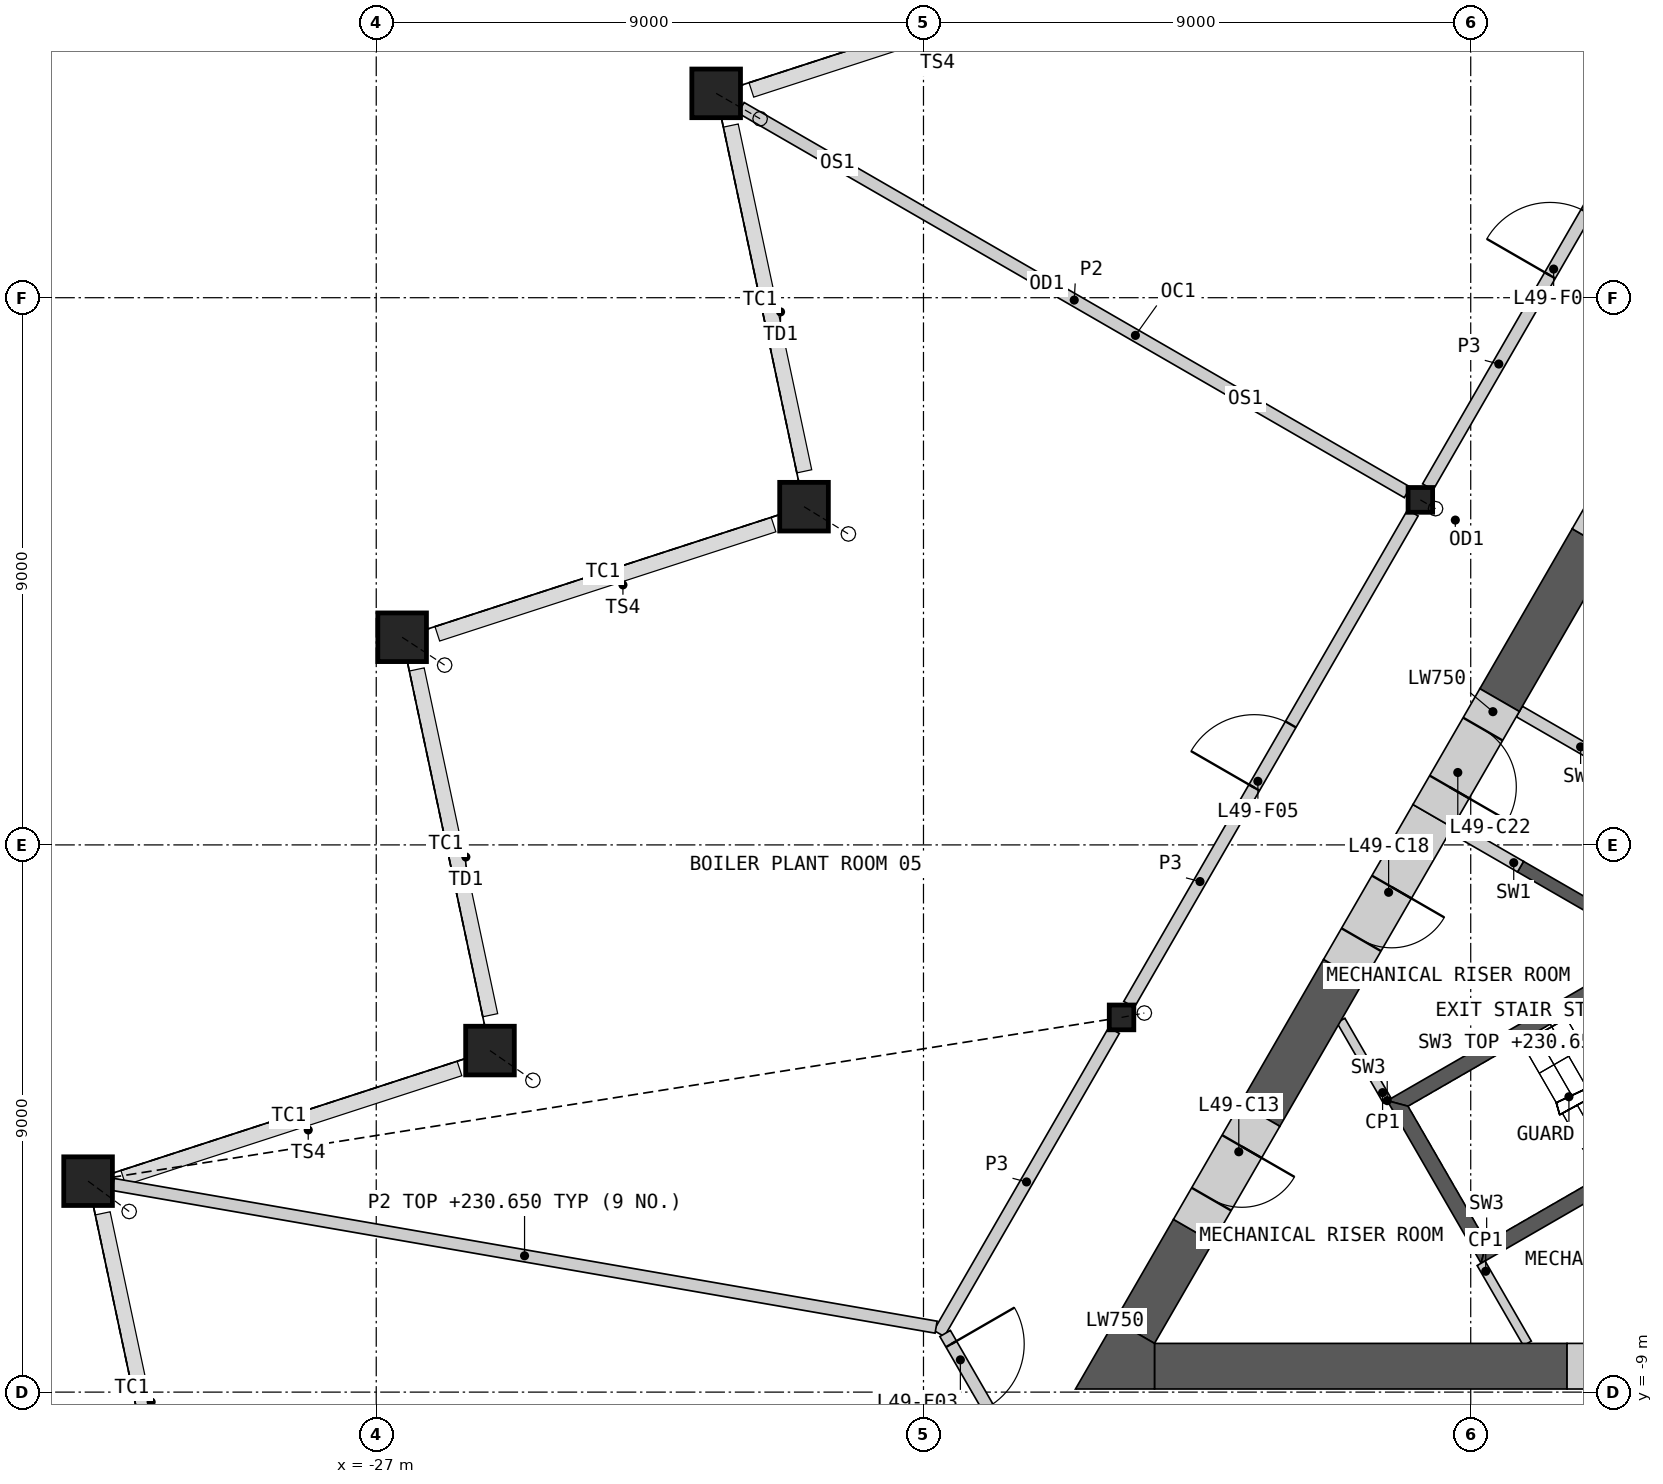
"""IFC4 building model, lengths in metres.
Left out: names, types, materials, properties, quantities, classifications, styles, units other than length and angle.
Written with IfcOpenShell. Run it as: python <this file> out.ifc"""

import sys

from ifc_helpers import new_model, si_unit, direction, frame, frame_2d, origin, origin_2d, place, context, subcontext, project, spatial, polyline, rectangle, hollow_rectangle, i_section, outline, extrude, element, fill, save


model = new_model("IFC4")
c1 = context("Model", 3, precision=1e-05, world=origin(), true_north=direction((0.0, 1.0)))
c2 = subcontext(c1, "Body", "Model", "MODEL_VIEW")
j1 = project(units=[si_unit("LENGTHUNIT", "METRE"), si_unit("PLANEANGLEUNIT", "RADIAN")], contexts=[c1])
p1 = place(None, origin())
s1 = spatial("IfcSite", under=j1, at=p1, CompositionType="ELEMENT")
p2 = place(p1, origin())
s2 = spatial("IfcBuilding", under=s1, at=p2, CompositionType="ELEMENT")
p3 = place(p2, frame((0.0, 0.0, 226.0)))
s3 = spatial("IfcBuildingStorey", under=s2, at=p3, CompositionType="ELEMENT", Elevation=226.0)
p4 = place(p3, frame((-21.409, 12.361, 0.0), z_axis=(0.142558983537, -0.082356710084, 0.986354048259), x_axis=(0.500228859883, 0.865893231143, 0.0)))
e1 = element("IfcColumn", 1, at=p4, inside=s3, PredefinedType="COLUMN", context=c2, shape_type="SweptSolid", body=[
    extrude(hollow_rectangle(XDim=0.8, YDim=0.8, WallThickness=0.05, at=origin_2d()), frame((0.0, 0.0, 0.067)), (0.0, 0.0, 1.0), 4.936),
])
p5 = place(p3, frame((-19.965, 5.563, 0.0), z_axis=(0.143805256431, -0.088362266, 0.985653163222), x_axis=(0.52352457136, 0.852010576919, 0.0)))
e2 = element("IfcColumn", 2, at=p5, inside=s3, PredefinedType="COLUMN", context=c2, shape_type="SweptSolid", body=[
    extrude(hollow_rectangle(XDim=0.8, YDim=0.8, WallThickness=0.05, at=origin_2d()), frame((0.0, 0.0, 0.069)), (0.0, 0.0, 1.0), 4.936),
])
p6 = place(p3, frame((-26.574, 3.415, 0.0), z_axis=(0.137929662691, -0.090347781846, 0.986312671755), x_axis=(0.547941692307, 0.836516528128, 0.0)))
e3 = element("IfcColumn", 3, at=p6, inside=s3, PredefinedType="COLUMN", context=c2, shape_type="SweptSolid", body=[
    extrude(hollow_rectangle(XDim=0.8, YDim=0.8, WallThickness=0.05, at=origin_2d()), frame((0.0, 0.0, 0.067)), (0.0, 0.0, 1.0), 4.936),
])
p7 = place(p3, frame((-25.129, -3.383, 0.0), z_axis=(0.139172656038, -0.096391020071, 0.985565696979), x_axis=(0.569372564358, 0.822079608649, 0.0)))
e4 = element("IfcColumn", 4, at=p7, inside=s3, PredefinedType="COLUMN", context=c2, shape_type="SweptSolid", body=[
    extrude(hollow_rectangle(XDim=0.8, YDim=0.8, WallThickness=0.05, at=origin_2d()), frame((0.0, 0.0, 0.069)), (0.0, 0.0, 1.0), 4.936),
])
p8 = place(p3, frame((-31.739, -5.53, 0.0), z_axis=(0.133288732676, -0.098377485859, 0.986182530781), x_axis=(0.593843336629, 0.804580692995, 0.0)))
e5 = element("IfcColumn", 5, at=p8, inside=s3, PredefinedType="COLUMN", context=c2, shape_type="SweptSolid", body=[
    extrude(hollow_rectangle(XDim=0.8, YDim=0.8, WallThickness=0.05, at=origin_2d()), frame((0.0, 0.0, 0.067)), (0.0, 0.0, 1.0), 4.936),
])
p9 = place(p3, frame((-9.828, 5.675, 0.0), z_axis=(0.049916818753, -0.028858160841, 0.998336375055), x_axis=(0.500502949238, 0.865734831114, 0.0)))
e6 = element("IfcColumn", 6, at=p9, inside=s3, PredefinedType="COLUMN", context=c2, shape_type="SweptSolid", body=[
    extrude(i_section(OverallWidth=0.404, OverallDepth=0.407, WebThickness=0.027, FlangeThickness=0.044, at=origin_2d()), frame((0.0, 0.0, 0.012)), (0.0, 0.0, 1.0), 4.985),
])
p10 = place(p3, frame((-14.743, -2.837, 0.0), z_axis=(0.074782233985, 0.014362473324, 0.997096453128), x_axis=(-0.188610251533, 0.982052021543, 0.0)))
e7 = element("IfcColumn", 7, at=p10, inside=s3, PredefinedType="COLUMN", context=c2, shape_type="SweptSolid", body=[
    extrude(i_section(OverallWidth=0.404, OverallDepth=0.407, WebThickness=0.027, FlangeThickness=0.044, at=origin_2d()), frame((0.0, 0.0, 0.016)), (0.0, 0.0, 1.0), 4.983),
])
p11 = place(p3, origin())
e8 = element("IfcWall", 8, at=p11, inside=s3, PredefinedType="SHEAR", context=c2, shape_type="SweptSolid", body=[
    extrude(outline(polyline([(-6.061, -1.697), (-8.231, -0.444), (-8.131, -0.271), (-5.96, -1.524), (-6.061, -1.697)])), origin(), (0.0, 0.0, 1.0), 4.65),
])
for number, where, z_axis, x_axis in (
    (9, (-7.081, 1.548, 0.0), (0.0, 0.0, 1.0), (-0.866, 0.5, 0.0)),
    (10, (-8.181, -0.357, 0.0), (0.0, 0.0, 1.0), (-0.866, 0.5, 0.0)),
):
    element("IfcWall", number, at=place(p3, frame(where, z_axis=z_axis, x_axis=x_axis)), inside=s3, PredefinedType="SHEAR", context=c2, shape_type="SweptSolid", body=[
        extrude(rectangle(XDim=1.293, YDim=0.2, at=frame_2d((0.646, 0.0))), origin(), (0.0, 0.0, 1.0), 4.65),
    ])
p12 = place(p3, origin())
e11 = element("IfcWall", 11, at=p12, inside=s3, PredefinedType="SHEAR", context=c2, shape_type="SweptSolid", body=[
    extrude(outline(polyline([(-5.307, -1.281), (-10.374, -4.206), (-10.032, -4.298), (-5.182, -1.498), (-5.307, -1.281)])), origin(), (0.0, 0.0, 1.0), 4.65),
])
p13 = place(p3, origin())
e12 = element("IfcWall", 12, at=p13, inside=s3, PredefinedType="SHEAR", context=c2, shape_type="SweptSolid", body=[
    extrude(outline(polyline([(-10.374, -4.206), (-8.83, -6.881), (-8.738, -6.539), (-10.032, -4.298), (-10.374, -4.206)])), origin(), (0.0, 0.0, 1.0), 4.65),
])
p14 = place(p3, origin())
e13 = element("IfcWall", 13, at=p14, inside=s3, PredefinedType="SHEAR", context=c2, shape_type="SweptSolid", body=[
    extrude(outline(polyline([(-8.738, -6.539), (-8.83, -6.881), (-3.763, -3.956), (-3.888, -3.739), (-8.738, -6.539)])), origin(), (0.0, 0.0, 1.0), 4.65),
])
for number, where, z_axis, x_axis in (
    (14, (-8.83, -6.881, 0.0), (0.0, 0.0, 1.0), (0.5, -0.866, 0.0)),
    (15, (-10.374, -4.206, 0.0), (0.0, 0.0, 1.0), (-0.5, 0.866, 0.0)),
):
    element("IfcWall", number, at=place(p3, frame(where, z_axis=z_axis, x_axis=x_axis)), inside=s3, PredefinedType="PARTITIONING", context=c2, shape_type="SweptSolid", body=[
        extrude(rectangle(XDim=1.522, YDim=0.15, at=frame_2d((0.761, 0.0))), origin(), (0.0, 0.0, 1.0), 4.65),
    ])
p15 = place(p3, frame((-14.201, -8.574, 0.0), z_axis=(0.0, 0.0, 1.0), x_axis=(1.0, 0.0, 0.0)))
e16 = element("IfcWall", 16, at=p15, inside=s3, PredefinedType="SHEAR", context=c2, shape_type="SweptSolid", body=[
    extrude(rectangle(XDim=6.785, YDim=0.75, at=frame_2d((3.393, 0.0))), origin(), (0.0, 0.0, 1.0), 4.65),
])
p16 = place(p3, frame((-7.006, 5.012, 0.0), z_axis=(0.0, 0.0, 1.0), x_axis=(-0.49996826437, -0.866043725583, 0.0)))
e17 = element("IfcWall", 17, at=p16, inside=s3, PredefinedType="SHEAR", context=c2, shape_type="SweptSolid", body=[
    extrude(rectangle(XDim=3.038, YDim=0.75, at=frame_2d((1.519, 0.0))), origin(), (0.0, 0.0, 1.0), 4.65),
])
p17 = place(p3, frame((-11.096, -2.07, 0.0), z_axis=(0.0, 0.0, 1.0), x_axis=(-0.49992834617, -0.86606676919, 0.0)))
e18 = element("IfcWall", 18, at=p17, inside=s3, PredefinedType="SHEAR", context=c2, shape_type="SweptSolid", body=[
    extrude(rectangle(XDim=2.737, YDim=0.75, at=frame_2d((1.369, 0.0))), origin(), (0.0, 0.0, 1.0), 4.65),
])
p18 = place(p3, frame((-13.564, -6.346, 0.0), z_axis=(0.0, 0.0, 1.0), x_axis=(-0.499989888488, -0.86603124159, 0.0)))
e19 = element("IfcWall", 19, at=p18, inside=s3, PredefinedType="SHEAR", context=c2, shape_type="SweptSolid", body=[
    extrude(rectangle(XDim=1.923, YDim=0.75, at=frame_2d((0.961, 0.0))), origin(), (0.0, 0.0, 1.0), 4.65),
])
p19 = place(p3, origin())
e20 = element("IfcWall", 20, at=p19, inside=s3, PredefinedType="SHEAR", context=c2, shape_type="SweptSolid", body=[
    extrude(outline(polyline([(-14.851, -7.824), (-14.201, -8.199), (-14.201, -8.949), (-15.5, -8.949), (-14.851, -7.824)])), origin(), (0.0, 0.0, 1.0), 4.65),
])
p20 = place(p3, frame((-12.464, -4.441, 0.0), z_axis=(0.0, 0.0, 1.0), x_axis=(-0.499994660107, -0.866028486751, 0.0)))
e21 = element("IfcWall", 21, at=p20, inside=s3, PredefinedType="SHEAR", context=c2, shape_type="SweptSolid", body=[
    extrude(rectangle(XDim=2.2, YDim=0.75, at=frame_2d((1.1, 0.0))), origin(), (0.0, 0.0, 1.0), 4.65),
])
p21 = place(p20, frame((0.6, 0.0, 0.0)))
e22 = element("IfcOpeningElement", 22, at=p21, cuts=e21, PredefinedType="OPENING", context=c2, shape_type="SweptSolid", body=[
    extrude(rectangle(XDim=1.0, YDim=2.1, at=frame_2d((0.5, 1.05))), frame((0.0, 0.385, 0.0), z_axis=(0.0, -1.0, 0.0), x_axis=(1.0, 0.0, 0.0)), (0.0, 0.0, 1.0), 0.77),
])
p22 = place(p3, frame((-5.906, 6.918, 0.0), z_axis=(0.0, 0.0, 1.0), x_axis=(-0.499946605688, -0.86605622881, 0.0)))
e23 = element("IfcWall", 23, at=p22, inside=s3, PredefinedType="SHEAR", context=c2, shape_type="SweptSolid", body=[
    extrude(rectangle(XDim=2.2, YDim=0.75, at=frame_2d((1.1, 0.0))), origin(), (0.0, 0.0, 1.0), 4.65),
])
p23 = place(p22, frame((0.6, 0.0, 0.0)))
e24 = element("IfcOpeningElement", 24, at=p23, cuts=e23, PredefinedType="OPENING", context=c2, shape_type="SweptSolid", body=[
    extrude(rectangle(XDim=1.0, YDim=2.1, at=frame_2d((0.5, 1.05))), frame((0.0, 0.385, 0.0), z_axis=(0.0, -1.0, 0.0), x_axis=(1.0, 0.0, 0.0)), (0.0, 0.0, 1.0), 0.77),
])
p24 = place(p3, frame((-9.625, 0.477, 0.0), z_axis=(0.0, 0.0, 1.0), x_axis=(-0.500005104963, -0.866022456413, 0.0)))
e25 = element("IfcWall", 25, at=p24, inside=s3, PredefinedType="SHEAR", context=c2, shape_type="SweptSolid", body=[
    extrude(rectangle(XDim=2.941, YDim=0.75, at=frame_2d((1.47, 0.0))), origin(), (0.0, 0.0, 1.0), 4.65),
])
p25 = place(p24, frame((1.35, 0.0, 0.0)))
e26 = element("IfcOpeningElement", 26, at=p25, cuts=e25, PredefinedType="OPENING", context=c2, shape_type="SweptSolid", body=[
    extrude(rectangle(XDim=1.0, YDim=2.1, at=frame_2d((0.5, 1.05))), frame((0.0, 0.385, 0.0), z_axis=(0.0, -1.0, 0.0), x_axis=(1.0, 0.0, 0.0)), (0.0, 0.0, 1.0), 0.77),
])
p26 = place(p3, frame((-7.416, -8.574, 0.0), z_axis=(0.0, 0.0, 1.0), x_axis=(1.0, 0.0, 0.0)))
e27 = element("IfcWall", 27, at=p26, inside=s3, PredefinedType="SHEAR", context=c2, shape_type="SweptSolid", body=[
    extrude(rectangle(XDim=2.2, YDim=0.75, at=frame_2d((1.1, 0.0))), origin(), (0.0, 0.0, 1.0), 4.65),
])
p27 = place(p26, frame((0.6, 0.0, 0.0)))
e28 = element("IfcOpeningElement", 28, at=p27, cuts=e27, PredefinedType="OPENING", context=c2, shape_type="SweptSolid", body=[
    extrude(rectangle(XDim=1.0, YDim=2.1, at=frame_2d((0.5, 1.05))), frame((0.0, 0.385, 0.0), z_axis=(0.0, -1.0, 0.0), x_axis=(1.0, 0.0, 0.0)), (0.0, 0.0, 1.0), 0.77),
])
p28 = place(p3, frame((-8.525, 2.382, 0.0), z_axis=(0.0, 0.0, 1.0), x_axis=(-0.500077893725, -0.86598042715, 0.0)))
e29 = element("IfcWall", 29, at=p28, inside=s3, PredefinedType="SHEAR", context=c2, shape_type="SweptSolid", body=[
    extrude(rectangle(XDim=2.2, YDim=0.75, at=frame_2d((1.1, 0.0))), origin(), (0.0, 0.0, 1.0), 4.65),
])
p29 = place(p28, frame((0.55, 0.0, 0.0)))
e30 = element("IfcOpeningElement", 30, at=p29, cuts=e29, PredefinedType="OPENING", context=c2, shape_type="SweptSolid", body=[
    extrude(rectangle(XDim=1.1, YDim=2.1, at=frame_2d((0.55, 1.05))), frame((0.0, 0.385, 0.0), z_axis=(0.0, -1.0, 0.0), x_axis=(1.0, 0.0, 0.0)), (0.0, 0.0, 1.0), 0.77),
])
p30 = place(p3, frame((-9.705, 5.888, 0.0), z_axis=(0.0, 0.0, 1.0), x_axis=(0.50000393355, 0.866023132736, 0.0)))
e31 = element("IfcWall", 31, at=p30, inside=s3, PredefinedType="PARTITIONING", context=c2, shape_type="SweptSolid", body=[
    extrude(rectangle(XDim=9.335, YDim=0.2, at=frame_2d((4.667, 0.0))), origin(), (0.0, 0.0, 1.0), 4.65),
])
p31 = place(p30, frame((4.017, 0.0, 0.0)))
e32 = element("IfcOpeningElement", 32, at=p31, cuts=e31, PredefinedType="OPENING", context=c2, shape_type="SweptSolid", body=[
    extrude(rectangle(XDim=1.2, YDim=2.1, at=frame_2d((0.6, 1.05))), frame((0.0, 0.11, 0.0), z_axis=(0.0, -1.0, 0.0), x_axis=(1.0, 0.0, 0.0)), (0.0, 0.0, 1.0), 0.22),
])
p32 = place(p3, frame((-14.619, -2.624, 0.0), z_axis=(0.0, 0.0, 1.0), x_axis=(0.50000393355, 0.866023132736, 0.0)))
e33 = element("IfcWall", 33, at=p32, inside=s3, PredefinedType="PARTITIONING", context=c2, shape_type="SweptSolid", body=[
    extrude(rectangle(XDim=9.335, YDim=0.2, at=frame_2d((4.667, 0.0))), origin(), (0.0, 0.0, 1.0), 4.65),
])
p33 = place(p32, frame((4.118, 0.0, 0.0)))
e34 = element("IfcOpeningElement", 34, at=p33, cuts=e33, PredefinedType="OPENING", context=c2, shape_type="SweptSolid", body=[
    extrude(rectangle(XDim=1.2, YDim=2.1, at=frame_2d((0.6, 1.05))), frame((0.0, 0.11, 0.0), z_axis=(0.0, -1.0, 0.0), x_axis=(1.0, 0.0, 0.0)), (0.0, 0.0, 1.0), 0.22),
])
p34 = place(p3, frame((-17.744, -8.035, 0.0), z_axis=(0.0, 0.0, 1.0), x_axis=(0.499975807604, 0.86603937082, 0.0)))
e35 = element("IfcWall", 35, at=p34, inside=s3, PredefinedType="PARTITIONING", context=c2, shape_type="SweptSolid", body=[
    extrude(rectangle(XDim=5.756, YDim=0.2, at=frame_2d((2.878, 0.0))), origin(), (0.0, 0.0, 1.0), 4.65),
])
p35 = place(p3, frame((-17.644, -8.035, 0.0), z_axis=(0.0, 0.0, 1.0), x_axis=(0.499958791762, -0.866049194065, 0.0)))
e36 = element("IfcWall", 36, at=p35, inside=s3, PredefinedType="PARTITIONING", context=c2, shape_type="SweptSolid", body=[
    extrude(rectangle(XDim=3.726, YDim=0.2, at=frame_2d((1.863, 0.0))), origin(), (0.0, 0.0, 1.0), 4.65),
])
p36 = place(p35, frame((0.201, 0.0, 0.0)))
e37 = element("IfcOpeningElement", 37, at=p36, cuts=e36, PredefinedType="OPENING", context=c2, shape_type="SweptSolid", body=[
    extrude(rectangle(XDim=1.2, YDim=2.1, at=frame_2d((0.6, 1.05))), frame((0.0, 0.11, 0.0), z_axis=(0.0, -1.0, 0.0), x_axis=(1.0, 0.0, 0.0)), (0.0, 0.0, 1.0), 0.22),
])
p37 = place(p3, frame((-31.329, -5.584, 0.0), z_axis=(0.0, 0.0, 1.0), x_axis=(0.985288995773, -0.170896444691, 0.0)))
e38 = element("IfcWall", 38, at=p37, inside=s3, PredefinedType="PARTITIONING", context=c2, shape_type="SweptSolid", body=[
    extrude(rectangle(XDim=13.739, YDim=0.2, at=frame_2d((6.869, 0.0))), origin(), (0.0, 0.0, 1.0), 4.65),
])
p38 = place(p3, frame((-21.0, 12.124, 0.0), z_axis=(0.0, 0.0, 1.0), x_axis=(0.866025883649, -0.499999168849, 0.0)))
e39 = element("IfcWall", 39, at=p38, inside=s3, PredefinedType="PARTITIONING", context=c2, shape_type="SweptSolid", body=[
    extrude(rectangle(XDim=12.652, YDim=0.2, at=frame_2d((6.326, 0.0))), origin(), (0.0, 0.0, 1.0), 4.65),
])
p39 = place(p21, origin())
e40 = element("IfcDoor", 40, at=p39, inside=s3, OperationType="SINGLE_SWING_LEFT", PredefinedType="DOOR", context=c2, shape_type="SweptSolid", body=[
    extrude(rectangle(XDim=1.0, YDim=2.1, at=frame_2d((0.5, 1.05))), frame((0.0, 0.13, 0.0), z_axis=(0.0, -1.0, 0.0), x_axis=(1.0, 0.0, 0.0)), (0.0, 0.0, 1.0), 0.05),
])
fill(e22, e40)
p40 = place(p25, origin())
e41 = element("IfcDoor", 41, at=p40, inside=s3, OperationType="SINGLE_SWING_LEFT", PredefinedType="DOOR", context=c2, shape_type="SweptSolid", body=[
    extrude(rectangle(XDim=1.0, YDim=2.1, at=frame_2d((0.5, 1.05))), frame((0.0, 0.13, 0.0), z_axis=(0.0, -1.0, 0.0), x_axis=(1.0, 0.0, 0.0)), (0.0, 0.0, 1.0), 0.05),
])
fill(e26, e41)
p41 = place(p29, origin())
e42 = element("IfcDoor", 42, at=p41, inside=s3, OperationType="SINGLE_SWING_RIGHT", PredefinedType="DOOR", context=c2, shape_type="SweptSolid", body=[
    extrude(rectangle(XDim=1.1, YDim=2.1, at=frame_2d((0.55, 1.05))), frame((0.0, 0.13, 0.0), z_axis=(0.0, -1.0, 0.0), x_axis=(1.0, 0.0, 0.0)), (0.0, 0.0, 1.0), 0.05),
])
fill(e30, e42)
p42 = place(p36, origin())
e43 = element("IfcDoor", 43, at=p42, inside=s3, OperationType="SINGLE_SWING_LEFT", PredefinedType="DOOR", context=c2, shape_type="SweptSolid", body=[
    extrude(rectangle(XDim=1.2, YDim=2.1, at=frame_2d((0.6, 1.05))), frame((0.0, 0.025, 0.0), z_axis=(0.0, -1.0, 0.0), x_axis=(1.0, 0.0, 0.0)), (0.0, 0.0, 1.0), 0.05),
])
fill(e37, e43)
p43 = place(p33, origin())
e44 = element("IfcDoor", 44, at=p43, inside=s3, OperationType="SINGLE_SWING_LEFT", PredefinedType="DOOR", context=c2, shape_type="SweptSolid", body=[
    extrude(rectangle(XDim=1.2, YDim=2.1, at=frame_2d((0.6, 1.05))), frame((0.0, 0.025, 0.0), z_axis=(0.0, -1.0, 0.0), x_axis=(1.0, 0.0, 0.0)), (0.0, 0.0, 1.0), 0.05),
])
fill(e34, e44)
p44 = place(p31, origin())
e45 = element("IfcDoor", 45, at=p44, inside=s3, OperationType="SINGLE_SWING_LEFT", PredefinedType="DOOR", context=c2, shape_type="SweptSolid", body=[
    extrude(rectangle(XDim=1.2, YDim=2.1, at=frame_2d((0.6, 1.05))), frame((0.0, 0.025, 0.0), z_axis=(0.0, -1.0, 0.0), x_axis=(1.0, 0.0, 0.0)), (0.0, 0.0, 1.0), 0.05),
])
fill(e32, e45)
save(model, sys.argv[1])
